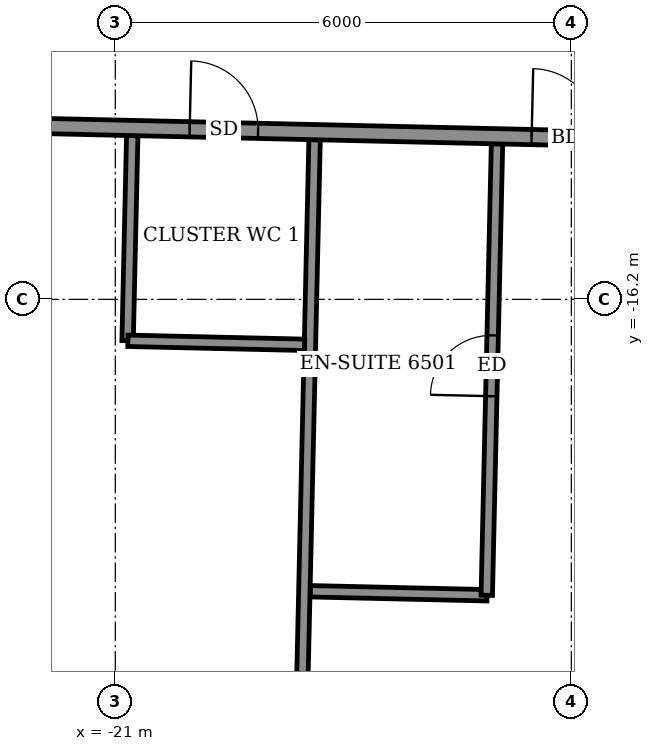
"""IFC4 building model, lengths in metres.
Left out: names, types, materials, properties, quantities, classifications, styles, units other than length and angle.
Written with IfcOpenShell. Run it as: python <this file> out.ifc"""

import sys

from ifc_helpers import new_model, si_unit, direction, frame, frame_2d, origin, place, context, subcontext, project, spatial, rectangle, extrude, element, fill, save


model = new_model("IFC4")
c1 = context("Model", 3, precision=1e-05, world=origin(), true_north=direction((0.0, 1.0)))
c2 = subcontext(c1, "Body", "Model", "MODEL_VIEW")
j1 = project(units=[si_unit("LENGTHUNIT", "METRE"), si_unit("PLANEANGLEUNIT", "RADIAN")], contexts=[c1])
p1 = place(None, origin())
s1 = spatial("IfcSite", under=j1, at=p1, CompositionType="ELEMENT")
p2 = place(p1, origin())
s2 = spatial("IfcBuilding", under=s1, at=p2, CompositionType="ELEMENT")
p3 = place(p2, frame((0.0, 0.0, 257.3)))
s3 = spatial("IfcBuildingStorey", under=s2, at=p3, CompositionType="ELEMENT", Elevation=257.3)
p4 = place(p3, frame((-18.659, -26.497, 0.0), z_axis=(0.0, 0.0, 1.0), x_axis=(0.022661475803, 0.999743195783, 0.0)))
e1 = element("IfcWall", 1, at=p4, inside=s3, PredefinedType="PARTITIONING", context=c2, shape_type="SweptSolid", body=[
    extrude(rectangle(XDim=12.4, YDim=0.15, at=frame_2d((6.2, 0.0))), origin(), (0.0, 0.0, 1.0), 2.55),
])
p5 = place(p3, frame((-18.433, -20.04, 0.0), z_axis=(0.0, 0.0, 1.0), x_axis=(0.99974031529, -0.022788198363, 0.0)))
e2 = element("IfcWall", 2, at=p5, inside=s3, PredefinedType="PARTITIONING", context=c2, shape_type="SweptSolid", body=[
    extrude(rectangle(XDim=2.325, YDim=0.15, at=frame_2d((1.162, 0.0))), origin(), (0.0, 0.0, 1.0), 3.05),
])
p6 = place(p3, frame((-16.113, -20.093, 0.0), z_axis=(0.0, 0.0, 1.0), x_axis=(0.022727006686, 0.999741708226, 0.0)))
e3 = element("IfcWall", 3, at=p6, inside=s3, PredefinedType="PARTITIONING", context=c2, shape_type="SweptSolid", body=[
    extrude(rectangle(XDim=5.94, YDim=0.15, at=frame_2d((2.97, 0.0))), origin(), (0.0, 0.0, 1.0), 3.05),
])
p7 = place(p6, frame((2.62, 0.0, 0.0)))
e4 = element("IfcOpeningElement", 4, at=p7, cuts=e3, PredefinedType="OPENING", context=c2, shape_type="SweptSolid", body=[
    extrude(rectangle(XDim=0.8, YDim=2.1, at=frame_2d((0.4, 1.05))), frame((0.0, 0.085, 0.0), z_axis=(0.0, -1.0, 0.0), x_axis=(1.0, 0.0, 0.0)), (0.0, 0.0, 1.0), 0.17),
])
p8 = place(p3, frame((-20.838, -16.745, 0.0), z_axis=(0.0, 0.0, 1.0), x_axis=(0.022515998029, 0.999746482781, 0.0)))
e5 = element("IfcWall", 5, at=p8, inside=s3, PredefinedType="PARTITIONING", context=c2, shape_type="SweptSolid", body=[
    extrude(rectangle(XDim=2.7, YDim=0.15, at=frame_2d((1.35, 0.0))), origin(), (0.0, 0.0, 1.0), 3.05),
])
p9 = place(p3, frame((-20.834, -16.745, 0.0), z_axis=(0.0, 0.0, 1.0), x_axis=(0.999740260747, -0.02279059109, 0.0)))
e6 = element("IfcWall", 6, at=p9, inside=s3, PredefinedType="PARTITIONING", context=c2, shape_type="SweptSolid", body=[
    extrude(rectangle(XDim=2.324, YDim=0.15, at=frame_2d((1.162, 0.0))), origin(), (0.0, 0.0, 1.0), 3.05),
])
p10 = place(p3, frame((-25.12, -13.847, 0.0), z_axis=(0.0, 0.0, 1.0), x_axis=(0.999742852445, -0.022676617578, 0.0)))
e7 = element("IfcWall", 7, at=p10, inside=s3, PredefinedType="PARTITIONING", context=c2, shape_type="SweptSolid", body=[
    extrude(rectangle(XDim=52.873, YDim=0.2, at=frame_2d((26.437, 0.0))), origin(), (0.0, 0.0, 1.0), 3.05),
])
p11 = place(p10, frame((0.725, 0.0, 0.0)))
e8 = element("IfcOpeningElement", 8, at=p11, cuts=e7, PredefinedType="OPENING", context=c2, shape_type="SweptSolid", body=[
    extrude(rectangle(XDim=1.0, YDim=2.1, at=frame_2d((0.5, 1.05))), frame((0.0, 0.11, 0.0), z_axis=(0.0, -1.0, 0.0), x_axis=(1.0, 0.0, 0.0)), (0.0, 0.0, 1.0), 0.22),
])
p12 = place(p10, frame((5.1, 0.0, 0.0)))
e9 = element("IfcOpeningElement", 9, at=p12, cuts=e7, PredefinedType="OPENING", context=c2, shape_type="SweptSolid", body=[
    extrude(rectangle(XDim=0.9, YDim=2.1, at=frame_2d((0.45, 1.05))), frame((0.0, 0.11, 0.0), z_axis=(0.0, -1.0, 0.0), x_axis=(1.0, 0.0, 0.0)), (0.0, 0.0, 1.0), 0.22),
])
p13 = place(p10, frame((9.6, 0.0, 0.0)))
e10 = element("IfcOpeningElement", 10, at=p13, cuts=e7, PredefinedType="OPENING", context=c2, shape_type="SweptSolid", body=[
    extrude(rectangle(XDim=0.9, YDim=2.1, at=frame_2d((0.45, 1.05))), frame((0.0, 0.11, 0.0), z_axis=(0.0, -1.0, 0.0), x_axis=(1.0, 0.0, 0.0)), (0.0, 0.0, 1.0), 0.22),
])
p14 = place(p10, frame((11.45, 0.0, 0.0)))
e11 = element("IfcOpeningElement", 11, at=p14, cuts=e7, PredefinedType="OPENING", context=c2, shape_type="SweptSolid", body=[
    extrude(rectangle(XDim=0.9, YDim=2.1, at=frame_2d((0.45, 1.05))), frame((0.0, 0.11, 0.0), z_axis=(0.0, -1.0, 0.0), x_axis=(1.0, 0.0, 0.0)), (0.0, 0.0, 1.0), 0.22),
])
p15 = place(p10, frame((18.15, 0.0, 0.0)))
e12 = element("IfcOpeningElement", 12, at=p15, cuts=e7, PredefinedType="OPENING", context=c2, shape_type="SweptSolid", body=[
    extrude(rectangle(XDim=0.9, YDim=2.1, at=frame_2d((0.45, 1.05))), frame((0.0, 0.11, 0.0), z_axis=(0.0, -1.0, 0.0), x_axis=(1.0, 0.0, 0.0)), (0.0, 0.0, 1.0), 0.22),
])
p16 = place(p10, frame((20.05, 0.0, 0.0)))
e13 = element("IfcOpeningElement", 13, at=p16, cuts=e7, PredefinedType="OPENING", context=c2, shape_type="SweptSolid", body=[
    extrude(rectangle(XDim=0.9, YDim=2.1, at=frame_2d((0.45, 1.05))), frame((0.0, 0.11, 0.0), z_axis=(0.0, -1.0, 0.0), x_axis=(1.0, 0.0, 0.0)), (0.0, 0.0, 1.0), 0.22),
])
p17 = place(p10, frame((26.775, 0.0, 0.0)))
e14 = element("IfcOpeningElement", 14, at=p17, cuts=e7, PredefinedType="OPENING", context=c2, shape_type="SweptSolid", body=[
    extrude(rectangle(XDim=0.9, YDim=2.1, at=frame_2d((0.45, 1.05))), frame((0.0, 0.11, 0.0), z_axis=(0.0, -1.0, 0.0), x_axis=(1.0, 0.0, 0.0)), (0.0, 0.0, 1.0), 0.22),
])
p18 = place(p10, frame((28.675, 0.0, 0.0)))
e15 = element("IfcOpeningElement", 15, at=p18, cuts=e7, PredefinedType="OPENING", context=c2, shape_type="SweptSolid", body=[
    extrude(rectangle(XDim=0.9, YDim=2.1, at=frame_2d((0.45, 1.05))), frame((0.0, 0.11, 0.0), z_axis=(0.0, -1.0, 0.0), x_axis=(1.0, 0.0, 0.0)), (0.0, 0.0, 1.0), 0.22),
])
p19 = place(p10, frame((35.35, 0.0, 0.0)))
e16 = element("IfcOpeningElement", 16, at=p19, cuts=e7, PredefinedType="OPENING", context=c2, shape_type="SweptSolid", body=[
    extrude(rectangle(XDim=0.9, YDim=2.1, at=frame_2d((0.45, 1.05))), frame((0.0, 0.11, 0.0), z_axis=(0.0, -1.0, 0.0), x_axis=(1.0, 0.0, 0.0)), (0.0, 0.0, 1.0), 0.22),
])
p20 = place(p10, frame((37.225, 0.0, 0.0)))
e17 = element("IfcOpeningElement", 17, at=p20, cuts=e7, PredefinedType="OPENING", context=c2, shape_type="SweptSolid", body=[
    extrude(rectangle(XDim=0.9, YDim=2.1, at=frame_2d((0.45, 1.05))), frame((0.0, 0.11, 0.0), z_axis=(0.0, -1.0, 0.0), x_axis=(1.0, 0.0, 0.0)), (0.0, 0.0, 1.0), 0.22),
])
p21 = place(p10, frame((43.85, 0.0, 0.0)))
e18 = element("IfcOpeningElement", 18, at=p21, cuts=e7, PredefinedType="OPENING", context=c2, shape_type="SweptSolid", body=[
    extrude(rectangle(XDim=0.9, YDim=2.1, at=frame_2d((0.45, 1.05))), frame((0.0, 0.11, 0.0), z_axis=(0.0, -1.0, 0.0), x_axis=(1.0, 0.0, 0.0)), (0.0, 0.0, 1.0), 0.22),
])
p22 = place(p10, frame((50.786, 0.0, 0.0)))
e19 = element("IfcOpeningElement", 19, at=p22, cuts=e7, PredefinedType="OPENING", context=c2, shape_type="SweptSolid", body=[
    extrude(rectangle(XDim=1.0, YDim=2.1, at=frame_2d((0.5, 1.05))), frame((0.0, 0.11, 0.0), z_axis=(0.0, -1.0, 0.0), x_axis=(1.0, 0.0, 0.0)), (0.0, 0.0, 1.0), 0.22),
])
p23 = place(p10, frame((46.05, 0.0, 0.0)))
e20 = element("IfcOpeningElement", 20, at=p23, cuts=e7, PredefinedType="OPENING", context=c2, shape_type="SweptSolid", body=[
    extrude(rectangle(XDim=0.9, YDim=2.1, at=frame_2d((0.45, 1.05))), frame((0.0, 0.11, 0.0), z_axis=(0.0, -1.0, 0.0), x_axis=(1.0, 0.0, 0.0)), (0.0, 0.0, 1.0), 0.22),
])
p24 = place(p12, origin())
e21 = element("IfcDoor", 21, at=p24, inside=s3, OperationType="SINGLE_SWING_LEFT", PredefinedType="DOOR", context=c2, shape_type="SweptSolid", body=[
    extrude(rectangle(XDim=0.9, YDim=2.1, at=frame_2d((0.45, 1.05))), frame((0.0, 0.025, 0.0), z_axis=(0.0, -1.0, 0.0), x_axis=(1.0, 0.0, 0.0)), (0.0, 0.0, 1.0), 0.05),
])
fill(e9, e21)
p25 = place(p13, origin())
e22 = element("IfcDoor", 22, at=p25, inside=s3, OperationType="SINGLE_SWING_LEFT", PredefinedType="DOOR", context=c2, shape_type="SweptSolid", body=[
    extrude(rectangle(XDim=0.9, YDim=2.1, at=frame_2d((0.45, 1.05))), frame((0.0, 0.025, 0.0), z_axis=(0.0, -1.0, 0.0), x_axis=(1.0, 0.0, 0.0)), (0.0, 0.0, 1.0), 0.05),
])
fill(e10, e22)
p26 = place(p7, origin())
e23 = element("IfcDoor", 23, at=p26, inside=s3, OperationType="SINGLE_SWING_LEFT", PredefinedType="DOOR", context=c2, shape_type="SweptSolid", body=[
    extrude(rectangle(XDim=0.8, YDim=2.1, at=frame_2d((0.4, 1.05))), frame((0.0, 0.025, 0.0), z_axis=(0.0, -1.0, 0.0), x_axis=(1.0, 0.0, 0.0)), (0.0, 0.0, 1.0), 0.05),
])
fill(e4, e23)
save(model, sys.argv[1])
